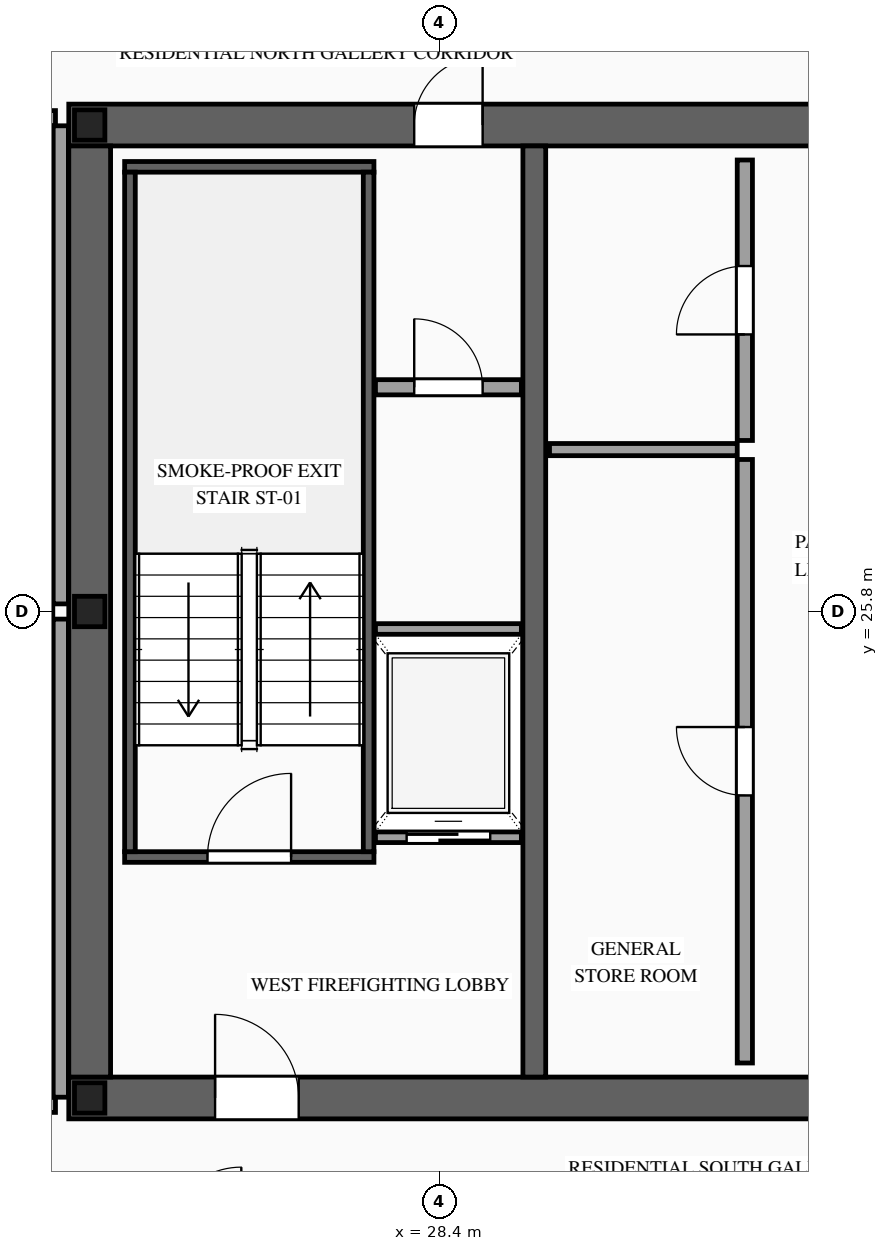
"""IFC4 building model, lengths in metres.
Left out: names, types, materials, properties, quantities, classifications, styles, units other than length and angle.
Written with IfcOpenShell. Run it as: python <this file> out.ifc"""

import sys

from ifc_helpers import new_model, si_unit, direction, frame, frame_2d, origin, origin_2d, place, context, subcontext, project, spatial, rectangle, i_section, extrude, source, transform, mapped, element, fill, save


model = new_model("IFC4")
c1 = context("Model", 3, precision=1e-05, world=origin(), true_north=direction((0.0, 1.0)))
c2 = subcontext(c1, "Body", "Model", "MODEL_VIEW")
j1 = project(units=[si_unit("LENGTHUNIT", "METRE"), si_unit("PLANEANGLEUNIT", "RADIAN")], contexts=[c1])
p1 = place(None, origin())
s1 = spatial("IfcSite", under=j1, at=p1, CompositionType="ELEMENT")
p2 = place(p1, origin())
s2 = spatial("IfcBuilding", under=s1, at=p2, CompositionType="ELEMENT")
p3 = place(p2, frame((0.0, 0.0, 234.6)))
s3 = spatial("IfcBuildingStorey", under=s2, at=p3, CompositionType="ELEMENT", Elevation=234.6)
p4 = place(p3, frame((23.525, 19.4, 0.0), z_axis=(0.0, 0.0, 1.0), x_axis=(1.0, 0.0, 0.0)))
e1 = element("IfcWall", 1, at=p4, inside=s3, PredefinedType="SHEAR", context=c2, shape_type="SweptSolid", body=[
    extrude(rectangle(XDim=26.95, YDim=0.55, at=frame_2d((13.475, 0.0))), origin(), (0.0, 0.0, 1.0), 3.5),
])
p5 = place(p4, frame((1.925, 0.0, 0.0)))
e2 = element("IfcOpeningElement", 2, at=p5, cuts=e1, PredefinedType="OPENING", context=c2, shape_type="SweptSolid", body=[
    extrude(rectangle(XDim=1.1, YDim=2.2, at=frame_2d((0.55, 1.1))), frame((0.0, 0.29, 0.0), z_axis=(0.0, -1.0, 0.0), x_axis=(1.0, 0.0, 0.0)), (0.0, 0.0, 1.0), 0.58),
])
p6 = place(p4, frame((9.825, 0.0, 0.0)))
e3 = element("IfcOpeningElement", 3, at=p6, cuts=e1, PredefinedType="OPENING", context=c2, shape_type="SweptSolid", body=[
    extrude(rectangle(XDim=1.1, YDim=2.2, at=frame_2d((0.55, 1.1))), frame((0.0, 0.29, 0.0), z_axis=(0.0, -1.0, 0.0), x_axis=(1.0, 0.0, 0.0)), (0.0, 0.0, 1.0), 0.58),
])
p7 = place(p4, frame((23.025, 0.0, 0.0)))
e4 = element("IfcOpeningElement", 4, at=p7, cuts=e1, PredefinedType="OPENING", context=c2, shape_type="SweptSolid", body=[
    extrude(rectangle(XDim=1.1, YDim=2.2, at=frame_2d((0.55, 1.1))), frame((0.0, 0.29, 0.0), z_axis=(0.0, -1.0, 0.0), x_axis=(1.0, 0.0, 0.0)), (0.0, 0.0, 1.0), 0.58),
])
p8 = place(p4, frame((19.645, 0.0, 0.0)))
e5 = element("IfcOpeningElement", 5, at=p8, cuts=e1, PredefinedType="OPENING", context=c2, shape_type="SweptSolid", body=[
    extrude(rectangle(XDim=0.9, YDim=2.15, at=frame_2d((0.45, 1.075))), frame((0.0, 0.29, 0.0), z_axis=(0.0, -1.0, 0.0), x_axis=(1.0, 0.0, 0.0)), (0.0, 0.0, 1.0), 0.58),
])
p9 = place(p4, frame((18.205, 0.0, 0.0)))
e6 = element("IfcOpeningElement", 6, at=p9, cuts=e1, PredefinedType="OPENING", context=c2, shape_type="SweptSolid", body=[
    extrude(rectangle(XDim=0.9, YDim=2.15, at=frame_2d((0.45, 1.075))), frame((0.0, 0.29, 0.0), z_axis=(0.0, -1.0, 0.0), x_axis=(1.0, 0.0, 0.0)), (0.0, 0.0, 1.0), 0.58),
])
p10 = place(p3, frame((23.525, 32.2, 0.0), z_axis=(0.0, 0.0, 1.0), x_axis=(1.0, 0.0, 0.0)))
e7 = element("IfcWall", 7, at=p10, inside=s3, PredefinedType="SHEAR", context=c2, shape_type="SweptSolid", body=[
    extrude(rectangle(XDim=26.95, YDim=0.55, at=frame_2d((13.475, 0.0))), origin(), (0.0, 0.0, 1.0), 3.5),
])
p11 = place(p10, frame((4.545, 0.0, 0.0)))
e8 = element("IfcOpeningElement", 8, at=p11, cuts=e7, PredefinedType="OPENING", context=c2, shape_type="SweptSolid", body=[
    extrude(rectangle(XDim=0.9, YDim=2.15, at=frame_2d((0.45, 1.075))), frame((0.0, 0.29, 0.0), z_axis=(0.0, -1.0, 0.0), x_axis=(1.0, 0.0, 0.0)), (0.0, 0.0, 1.0), 0.58),
])
p12 = place(p10, frame((9.825, 0.0, 0.0)))
e9 = element("IfcOpeningElement", 9, at=p12, cuts=e7, PredefinedType="OPENING", context=c2, shape_type="SweptSolid", body=[
    extrude(rectangle(XDim=1.1, YDim=2.2, at=frame_2d((0.55, 1.1))), frame((0.0, 0.29, 0.0), z_axis=(0.0, -1.0, 0.0), x_axis=(1.0, 0.0, 0.0)), (0.0, 0.0, 1.0), 0.58),
])
p13 = place(p10, frame((15.675, 0.0, 0.0)))
e10 = element("IfcOpeningElement", 10, at=p13, cuts=e7, PredefinedType="OPENING", context=c2, shape_type="SweptSolid", body=[
    extrude(rectangle(XDim=1.1, YDim=2.2, at=frame_2d((0.55, 1.1))), frame((0.0, 0.29, 0.0), z_axis=(0.0, -1.0, 0.0), x_axis=(1.0, 0.0, 0.0)), (0.0, 0.0, 1.0), 0.58),
])
p14 = place(p10, frame((18.205, 0.0, 0.0)))
e11 = element("IfcOpeningElement", 11, at=p14, cuts=e7, PredefinedType="OPENING", context=c2, shape_type="SweptSolid", body=[
    extrude(rectangle(XDim=0.9, YDim=2.15, at=frame_2d((0.45, 1.075))), frame((0.0, 0.29, 0.0), z_axis=(0.0, -1.0, 0.0), x_axis=(1.0, 0.0, 0.0)), (0.0, 0.0, 1.0), 0.58),
])
p15 = place(p10, frame((19.645, 0.0, 0.0)))
e12 = element("IfcOpeningElement", 12, at=p15, cuts=e7, PredefinedType="OPENING", context=c2, shape_type="SweptSolid", body=[
    extrude(rectangle(XDim=0.9, YDim=2.15, at=frame_2d((0.45, 1.075))), frame((0.0, 0.29, 0.0), z_axis=(0.0, -1.0, 0.0), x_axis=(1.0, 0.0, 0.0)), (0.0, 0.0, 1.0), 0.58),
])
m1 = source(origin(), c2, "Body", "SweptSolid", [
    extrude(rectangle(XDim=12.25, YDim=0.55, at=frame_2d((6.125, 0.0))), origin(), (0.0, 0.0, 1.0), 3.5),
])
p16 = place(p3, frame((23.8, 19.675, 0.0), z_axis=(0.0, 0.0, 1.0), x_axis=(0.0, 1.0, 0.0)))
e13 = element("IfcWall", 13, at=p16, inside=s3, PredefinedType="SHEAR", context=c2, shape_type="MappedRepresentation", body=[
    mapped(m1, transform((0.0, 0.0, 0.0), scale=1.0)),
])
m2 = source(origin(), c2, "Body", "SweptSolid", [
    extrude(rectangle(XDim=12.25, YDim=0.3, at=frame_2d((6.125, 0.0))), origin(), (0.0, 0.0, 1.0), 3.5),
])
p17 = place(p3, frame((29.65, 19.675, 0.0), z_axis=(0.0, 0.0, 1.0), x_axis=(0.0, 1.0, 0.0)))
e14 = element("IfcWall", 14, at=p17, inside=s3, PredefinedType="SOLIDWALL", context=c2, shape_type="MappedRepresentation", body=[
    mapped(m2, transform((0.0, 0.0, 0.0), scale=1.0)),
])
m3 = source(origin(), c2, "Body", "SweptSolid", [
    extrude(i_section(OverallWidth=0.4, OverallDepth=0.4, WebThickness=0.013, FlangeThickness=0.021, at=origin_2d()), origin(), (0.0, 0.0, 1.0), 3.5),
])
for number, where, z_axis, x_axis in (
    (15, (23.8, 19.4, 0.0), (0.0, 0.0, 1.0), (1.0, 0.0, 0.0)),
    (16, (23.8, 25.8, 0.0), (0.0, 0.0, 1.0), (1.0, 0.0, 0.0)),
    (17, (23.8, 32.2, 0.0), (0.0, 0.0, 1.0), (1.0, 0.0, 0.0)),
):
    element("IfcColumn", number, at=place(p3, frame(where, z_axis=z_axis, x_axis=x_axis)), inside=s3, PredefinedType="COLUMN", context=c2, shape_type="MappedRepresentation", body=[
        mapped(m3, transform((0.0, 0.0, 0.0), scale=1.0)),
    ])
p18 = place(p3, frame((27.56, 22.83, 0.0), z_axis=(0.0, 0.0, 1.0), x_axis=(1.0, 0.0, 0.0)))
e18 = element("IfcWall", 18, at=p18, inside=s3, PredefinedType="SOLIDWALL", context=c2, shape_type="SweptSolid", body=[
    extrude(rectangle(XDim=1.92, YDim=0.14, at=frame_2d((0.96, 0.0))), origin(), (0.0, 0.0, 1.0), 3.28),
])
p19 = place(p18, frame((0.41, 0.0, 0.0)))
e19 = element("IfcOpeningElement", 19, at=p19, cuts=e18, PredefinedType="OPENING", context=c2, shape_type="SweptSolid", body=[
    extrude(rectangle(XDim=1.1, YDim=2.2, at=frame_2d((0.55, 1.1))), frame((0.0, 0.085, 0.0), z_axis=(0.0, -1.0, 0.0), x_axis=(1.0, 0.0, 0.0)), (0.0, 0.0, 1.0), 0.17),
])
m4 = source(origin(), c2, "Body", "SweptSolid", [
    extrude(rectangle(XDim=1.92, YDim=0.14, at=frame_2d((0.96, 0.0))), origin(), (0.0, 0.0, 1.0), 3.28),
])
p20 = place(p3, frame((27.56, 25.57, 0.0), z_axis=(0.0, 0.0, 1.0), x_axis=(1.0, 0.0, 0.0)))
e20 = element("IfcWall", 20, at=p20, inside=s3, PredefinedType="SOLIDWALL", context=c2, shape_type="MappedRepresentation", body=[
    mapped(m4, transform((0.0, 0.0, 0.0), scale=1.0)),
])
p21 = place(p3, frame((24.26, 22.57, 0.0), z_axis=(0.0, 0.0, 1.0), x_axis=(1.0, 0.0, 0.0)))
e21 = element("IfcWall", 21, at=p21, inside=s3, PredefinedType="SOLIDWALL", context=c2, shape_type="SweptSolid", body=[
    extrude(rectangle(XDim=3.28, YDim=0.14, at=frame_2d((1.64, 0.0))), origin(), (0.0, 0.0, 1.0), 3.28),
])
p22 = place(p21, frame((1.09, 0.0, 0.0)))
e22 = element("IfcOpeningElement", 22, at=p22, cuts=e21, PredefinedType="OPENING", context=c2, shape_type="SweptSolid", body=[
    extrude(rectangle(XDim=1.1, YDim=2.2, at=frame_2d((0.55, 1.1))), frame((0.0, 0.085, 0.0), z_axis=(0.0, -1.0, 0.0), x_axis=(1.0, 0.0, 0.0)), (0.0, 0.0, 1.0), 0.17),
])
m5 = source(origin(), c2, "Body", "SweptSolid", [
    extrude(rectangle(XDim=3.28, YDim=0.14, at=frame_2d((1.64, 0.0))), origin(), (0.0, 0.0, 1.0), 3.28),
])
p23 = place(p3, frame((24.26, 31.65, 0.0), z_axis=(0.0, 0.0, 1.0), x_axis=(1.0, 0.0, 0.0)))
e23 = element("IfcWall", 23, at=p23, inside=s3, PredefinedType="SOLIDWALL", context=c2, shape_type="MappedRepresentation", body=[
    mapped(m5, transform((0.0, 0.0, 0.0), scale=1.0)),
])
m6 = source(origin(), c2, "Body", "SweptSolid", [
    extrude(rectangle(XDim=8.94, YDim=0.14, at=frame_2d((4.47, 0.0))), origin(), (0.0, 0.0, 1.0), 3.28),
])
for number, where, z_axis, x_axis in (
    (24, (24.33, 22.64, 0.0), (0.0, 0.0, 1.0), (0.0, 1.0, 0.0)),
    (25, (27.47, 22.64, 0.0), (0.0, 0.0, 1.0), (0.0, 1.0, 0.0)),
):
    element("IfcWall", number, at=place(p3, frame(where, z_axis=z_axis, x_axis=x_axis)), inside=s3, PredefinedType="SOLIDWALL", context=c2, shape_type="MappedRepresentation", body=[
        mapped(m6, transform((0.0, 0.0, 0.0), scale=1.0)),
    ])
p24 = place(p3, frame((27.56, 28.75, 0.0), z_axis=(0.0, 0.0, 1.0), x_axis=(1.0, 0.0, 0.0)))
e26 = element("IfcWall", 26, at=p24, inside=s3, PredefinedType="PARTITIONING", context=c2, shape_type="SweptSolid", body=[
    extrude(rectangle(XDim=1.92, YDim=0.2, at=frame_2d((0.96, 0.0))), origin(), (0.0, 0.0, 1.0), 3.28),
])
p25 = place(p24, frame((0.51, 0.0, 0.0)))
e27 = element("IfcOpeningElement", 27, at=p25, cuts=e26, PredefinedType="OPENING", context=c2, shape_type="SweptSolid", body=[
    extrude(rectangle(XDim=0.9, YDim=2.15, at=frame_2d((0.45, 1.075))), frame((0.0, 0.115, 0.0), z_axis=(0.0, -1.0, 0.0), x_axis=(1.0, 0.0, 0.0)), (0.0, 0.0, 1.0), 0.23),
])
p26 = place(p3, frame((32.42, 19.86, 0.0), z_axis=(0.0, 0.0, 1.0), x_axis=(0.0, 1.0, 0.0)))
e28 = element("IfcWall", 28, at=p26, inside=s3, PredefinedType="PARTITIONING", context=c2, shape_type="SweptSolid", body=[
    extrude(rectangle(XDim=7.94, YDim=0.2, at=frame_2d((3.97, 0.0))), origin(), (0.0, 0.0, 1.0), 3.28),
])
p27 = place(p26, frame((3.52, 0.0, 0.0)))
e29 = element("IfcOpeningElement", 29, at=p27, cuts=e28, PredefinedType="OPENING", context=c2, shape_type="SweptSolid", body=[
    extrude(rectangle(XDim=0.9, YDim=2.15, at=frame_2d((0.45, 1.075))), frame((0.0, 0.115, 0.0), z_axis=(0.0, -1.0, 0.0), x_axis=(1.0, 0.0, 0.0)), (0.0, 0.0, 1.0), 0.23),
])
p28 = place(p3, frame((32.42, 28.05, 0.0), z_axis=(0.0, 0.0, 1.0), x_axis=(0.0, 1.0, 0.0)))
e30 = element("IfcWall", 30, at=p28, inside=s3, PredefinedType="PARTITIONING", context=c2, shape_type="SweptSolid", body=[
    extrude(rectangle(XDim=3.69, YDim=0.2, at=frame_2d((1.845, 0.0))), origin(), (0.0, 0.0, 1.0), 3.28),
])
p29 = place(p28, frame((1.395, 0.0, 0.0)))
e31 = element("IfcOpeningElement", 31, at=p29, cuts=e30, PredefinedType="OPENING", context=c2, shape_type="SweptSolid", body=[
    extrude(rectangle(XDim=0.9, YDim=2.15, at=frame_2d((0.45, 1.075))), frame((0.0, 0.115, 0.0), z_axis=(0.0, -1.0, 0.0), x_axis=(1.0, 0.0, 0.0)), (0.0, 0.0, 1.0), 0.23),
])
m7 = source(origin(), c2, "Body", "SweptSolid", [
    extrude(rectangle(XDim=2.47, YDim=0.16, at=frame_2d((1.235, 0.0))), origin(), (0.0, 0.0, 1.0), 3.28),
])
p30 = place(p3, frame((29.85, 27.93, 0.0), z_axis=(0.0, 0.0, 1.0), x_axis=(1.0, 0.0, 0.0)))
e32 = element("IfcWall", 32, at=p30, inside=s3, PredefinedType="PARTITIONING", context=c2, shape_type="MappedRepresentation", body=[
    mapped(m7, transform((0.0, 0.0, 0.0), scale=1.0)),
])
p31 = place(p3, frame((16.55, 19.31, 0.0), z_axis=(0.0, 0.0, 1.0), x_axis=(1.0, 0.0, 0.0)))
e33 = element("IfcWall", 33, at=p31, inside=s3, PredefinedType="PARTITIONING", context=c2, shape_type="SweptSolid", body=[
    extrude(rectangle(XDim=6.8, YDim=0.2, at=frame_2d((3.4, 0.0))), origin(), (0.0, 0.0, 1.0), 2.825),
])
p32 = place(p31, frame((3.0, 0.0, 0.0)))
e34 = element("IfcOpeningElement", 34, at=p32, cuts=e33, PredefinedType="OPENING", context=c2, shape_type="SweptSolid", body=[
    extrude(rectangle(XDim=1.0, YDim=2.2, at=frame_2d((0.5, 1.1))), frame((0.0, 0.115, 0.0), z_axis=(0.0, -1.0, 0.0), x_axis=(1.0, 0.0, 0.0)), (0.0, 0.0, 1.0), 0.23),
])
m8 = source(origin(), c2, "Body", "SweptSolid", [
    extrude(rectangle(XDim=6.765, YDim=0.2, at=frame_2d((3.382, 0.0))), origin(), (0.0, 0.0, 1.0), 2.787),
])
p33 = place(p3, frame((16.55, 25.8, 0.0), z_axis=(0.0, 0.0, 1.0), x_axis=(1.0, 0.0, 0.0)))
e35 = element("IfcWall", 35, at=p33, inside=s3, PredefinedType="PARTITIONING", context=c2, shape_type="MappedRepresentation", body=[
    mapped(m8, transform((0.0, 0.0, 0.0), scale=1.0)),
])
m9 = source(origin(), c2, "Body", "SweptSolid", [
    extrude(rectangle(XDim=6.29, YDim=0.2, at=frame_2d((3.145, 0.0))), origin(), (0.0, 0.0, 1.0), 3.28),
])
p34 = place(p3, frame((23.42, 19.41, 0.0), z_axis=(0.0, 0.0, 1.0), x_axis=(0.0, 1.0, 0.0)))
e36 = element("IfcWall", 36, at=p34, inside=s3, PredefinedType="PARTITIONING", context=c2, shape_type="MappedRepresentation", body=[
    mapped(m9, transform((0.0, 0.0, 0.0), scale=1.0)),
])
p35 = place(p3, frame((16.55, 32.29, 0.0), z_axis=(0.0, 0.0, 1.0), x_axis=(1.0, 0.0, 0.0)))
e37 = element("IfcWall", 37, at=p35, inside=s3, PredefinedType="PARTITIONING", context=c2, shape_type="SweptSolid", body=[
    extrude(rectangle(XDim=6.8, YDim=0.2, at=frame_2d((3.4, 0.0))), origin(), (0.0, 0.0, 1.0), 2.825),
])
p36 = place(p35, frame((2.965, 0.0, 0.0)))
e38 = element("IfcOpeningElement", 38, at=p36, cuts=e37, PredefinedType="OPENING", context=c2, shape_type="SweptSolid", body=[
    extrude(rectangle(XDim=1.0, YDim=2.2, at=frame_2d((0.5, 1.1))), frame((0.0, 0.115, 0.0), z_axis=(0.0, -1.0, 0.0), x_axis=(1.0, 0.0, 0.0)), (0.0, 0.0, 1.0), 0.23),
])
p37 = place(p3, frame((23.42, 25.9, 0.0), z_axis=(0.0, 0.0, 1.0), x_axis=(0.0, 1.0, 0.0)))
e39 = element("IfcWall", 39, at=p37, inside=s3, PredefinedType="PARTITIONING", context=c2, shape_type="MappedRepresentation", body=[
    mapped(m9, transform((0.0, 0.0, 0.0), scale=1.0)),
])
m10 = source(origin(), c2, "Body", "SweptSolid", [
    extrude(rectangle(XDim=1.1, YDim=2.2, at=frame_2d((0.55, 1.1))), frame((0.0, 0.025, 0.0), z_axis=(0.0, -1.0, 0.0), x_axis=(1.0, 0.0, 0.0)), (0.0, 0.0, 1.0), 0.05),
])
p38 = place(p19, origin())
e40 = element("IfcDoor", 40, at=p38, inside=s3, OperationType="SLIDING_TO_LEFT", PredefinedType="DOOR", context=c2, shape_type="MappedRepresentation", body=[
    mapped(m10, transform((0.0, 0.0, 0.0), scale=1.0)),
])
fill(e19, e40)
m11 = source(origin(), c2, "Body", "SweptSolid", [
    extrude(rectangle(XDim=1.1, YDim=2.2, at=frame_2d((0.55, 1.1))), frame((0.0, 0.025, 0.0), z_axis=(0.0, -1.0, 0.0), x_axis=(1.0, 0.0, 0.0)), (0.0, 0.0, 1.0), 0.05),
])
p39 = place(p22, origin())
e41 = element("IfcDoor", 41, at=p39, inside=s3, OperationType="SINGLE_SWING_RIGHT", PredefinedType="DOOR", context=c2, shape_type="MappedRepresentation", body=[
    mapped(m11, transform((0.0, 0.0, 0.0), scale=1.0)),
])
fill(e22, e41)
p40 = place(p5, origin())
e42 = element("IfcDoor", 42, at=p40, inside=s3, OperationType="SINGLE_SWING_LEFT", PredefinedType="DOOR", context=c2, shape_type="MappedRepresentation", body=[
    mapped(m11, transform((0.0, 0.0, 0.0), scale=1.0)),
])
fill(e2, e42)
m12 = source(origin(), c2, "Body", "SweptSolid", [
    extrude(rectangle(XDim=0.9, YDim=2.15, at=frame_2d((0.45, 1.075))), frame((0.0, 0.025, 0.0), z_axis=(0.0, -1.0, 0.0), x_axis=(1.0, 0.0, 0.0)), (0.0, 0.0, 1.0), 0.05),
])
p41 = place(p11, origin())
e43 = element("IfcDoor", 43, at=p41, inside=s3, OperationType="SINGLE_SWING_RIGHT", PredefinedType="DOOR", context=c2, shape_type="MappedRepresentation", body=[
    mapped(m12, transform((0.0, 0.0, 0.0), scale=1.0)),
])
fill(e8, e43)
p42 = place(p25, origin())
e44 = element("IfcDoor", 44, at=p42, inside=s3, OperationType="SINGLE_SWING_LEFT", PredefinedType="DOOR", context=c2, shape_type="MappedRepresentation", body=[
    mapped(m12, transform((0.0, 0.0, 0.0), scale=1.0)),
])
fill(e27, e44)
p43 = place(p27, origin())
e45 = element("IfcDoor", 45, at=p43, inside=s3, OperationType="SINGLE_SWING_RIGHT", PredefinedType="DOOR", context=c2, shape_type="MappedRepresentation", body=[
    mapped(m12, transform((0.0, 0.0, 0.0), scale=1.0)),
])
fill(e29, e45)
p44 = place(p29, origin())
e46 = element("IfcDoor", 46, at=p44, inside=s3, OperationType="SINGLE_SWING_LEFT", PredefinedType="DOOR", context=c2, shape_type="MappedRepresentation", body=[
    mapped(m12, transform((0.0, 0.0, 0.0), scale=1.0)),
])
fill(e31, e46)
save(model, sys.argv[1])
